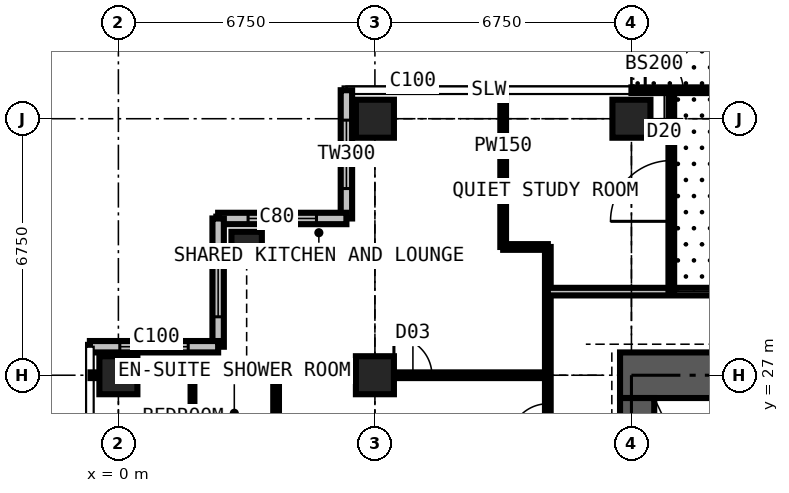
"""IFC4 building model, lengths in metres.
Left out: names, types, materials, properties, quantities, classifications, styles, units other than length and angle.
Written with IfcOpenShell. Run it as: python <this file> out.ifc"""

import sys

from ifc_helpers import new_model, si_unit, direction, frame, frame_2d, origin, origin_2d, place, context, subcontext, project, spatial, rectangle, extrude, element, fill, save


model = new_model("IFC4")
c1 = context("Model", 3, precision=1e-05, world=origin(), true_north=direction((0.0, 1.0)))
c2 = subcontext(c1, "Body", "Model", "MODEL_VIEW")
j1 = project(units=[si_unit("LENGTHUNIT", "METRE"), si_unit("PLANEANGLEUNIT", "RADIAN")], contexts=[c1])
p1 = place(None, origin())
s1 = spatial("IfcSite", under=j1, at=p1, CompositionType="ELEMENT")
p2 = place(p1, origin())
s2 = spatial("IfcBuilding", under=s1, at=p2, CompositionType="ELEMENT")
p3 = place(p2, frame((0.0, 0.0, 251.1)))
s3 = spatial("IfcBuildingStorey", under=s2, at=p3, CompositionType="ELEMENT", Elevation=251.1)
p4 = place(p3, frame((0.0, 27.0, 0.0), z_axis=(0.0, 0.0, 1.0), x_axis=(1.0, 0.0, 0.0)))
e1 = element("IfcColumn", 1, at=p4, inside=s3, PredefinedType="COLUMN", context=c2, shape_type="SweptSolid", body=[
    extrude(rectangle(XDim=1.0, YDim=1.0, at=origin_2d()), origin(), (0.0, 0.0, 1.0), 3.6),
])
p5 = place(p3, frame((3.375, 30.375, 0.0), z_axis=(0.0, 0.0, 1.0), x_axis=(1.0, 0.0, 0.0)))
e2 = element("IfcColumn", 2, at=p5, inside=s3, PredefinedType="COLUMN", context=c2, shape_type="SweptSolid", body=[
    extrude(rectangle(XDim=0.8, YDim=0.8, at=origin_2d()), origin(), (0.0, 0.0, 1.0), 3.6),
])
for number, where, z_axis, x_axis in (
    (3, (6.75, 27.0, 0.0), (0.0, 0.0, 1.0), (1.0, 0.0, 0.0)),
    (4, (6.75, 33.75, 0.0), (0.0, 0.0, 1.0), (1.0, 0.0, 0.0)),
    (5, (13.5, 33.75, 0.0), (0.0, 0.0, 1.0), (1.0, 0.0, 0.0)),
):
    element("IfcColumn", number, at=place(p3, frame(where, z_axis=z_axis, x_axis=x_axis)), inside=s3, PredefinedType="COLUMN", context=c2, shape_type="SweptSolid", body=[
        extrude(rectangle(XDim=1.0, YDim=1.0, at=origin_2d()), origin(), (0.0, 0.0, 1.0), 3.6),
    ])
p6 = place(p3, frame((27.3, 27.0, 0.0), z_axis=(0.0, 0.0, 1.0), x_axis=(-1.0, 0.0, 0.0)))
e6 = element("IfcWall", 6, at=p6, inside=s3, PredefinedType="SHEAR", context=c2, shape_type="SweptSolid", body=[
    extrude(rectangle(XDim=14.1, YDim=1.2, at=frame_2d((7.05, 0.0))), origin(), (0.0, 0.0, 1.0), 3.6),
])
p7 = place(p6, frame((5.225, 0.0, 0.0)))
e7 = element("IfcOpeningElement", 7, at=p7, cuts=e6, PredefinedType="OPENING", context=c2, shape_type="SweptSolid", body=[
    extrude(rectangle(XDim=0.9, YDim=2.2, at=frame_2d((0.45, 1.1))), frame((0.0, 0.61, 0.0), z_axis=(0.0, -1.0, 0.0), x_axis=(1.0, 0.0, 0.0)), (0.0, 0.0, 1.0), 1.22),
])
p8 = place(p6, frame((8.2, 0.0, 0.0)))
e8 = element("IfcOpeningElement", 8, at=p8, cuts=e6, PredefinedType="OPENING", context=c2, shape_type="SweptSolid", body=[
    extrude(rectangle(XDim=1.0, YDim=2.2, at=frame_2d((0.5, 1.1))), frame((0.0, 0.61, 0.0), z_axis=(0.0, -1.0, 0.0), x_axis=(1.0, 0.0, 0.0)), (0.0, 0.0, 1.0), 1.22),
])
p9 = place(p3, frame((13.65, 26.4, 0.0), z_axis=(0.0, 0.0, 1.0), x_axis=(0.0, -1.0, 0.0)))
e9 = element("IfcWall", 9, at=p9, inside=s3, PredefinedType="SHEAR", context=c2, shape_type="SweptSolid", body=[
    extrude(rectangle(XDim=12.3, YDim=0.9, at=frame_2d((6.15, 0.0))), origin(), (0.0, 0.0, 1.0), 3.6),
])
p10 = place(p9, frame((7.45, 0.0, 0.0)))
e10 = element("IfcOpeningElement", 10, at=p10, cuts=e9, PredefinedType="OPENING", context=c2, shape_type="SweptSolid", body=[
    extrude(rectangle(XDim=1.2, YDim=2.2, at=frame_2d((0.6, 1.1))), frame((0.0, 0.46, 0.0), z_axis=(0.0, -1.0, 0.0), x_axis=(1.0, 0.0, 0.0)), (0.0, 0.0, 1.0), 0.92),
])
p11 = place(p3, frame((13.5, 34.5, 0.0), z_axis=(0.0, 0.0, 1.0), x_axis=(1.0, 0.0, 0.0)))
e11 = element("IfcWall", 11, at=p11, inside=s3, PredefinedType="SOLIDWALL", context=c2, shape_type="SweptSolid", body=[
    extrude(rectangle(XDim=6.75, YDim=0.15, at=frame_2d((3.375, 0.0))), origin(), (0.0, 0.0, 1.0), 3.3),
])
p12 = place(p11, frame((0.363, 0.0, 0.0)))
e12 = element("IfcOpeningElement", 12, at=p12, cuts=e11, PredefinedType="OPENING", context=c2, shape_type="SweptSolid", body=[
    extrude(rectangle(XDim=1.0, YDim=2.2, at=frame_2d((0.5, 1.1))), frame((0.0, 0.085, 0.0), z_axis=(0.0, -1.0, 0.0), x_axis=(1.0, 0.0, 0.0)), (0.0, 0.0, 1.0), 0.17),
])
p13 = place(p11, frame((1.725, 0.0, 0.9)))
e13 = element("IfcOpeningElement", 13, at=p13, cuts=e11, PredefinedType="OPENING", context=c2, shape_type="SweptSolid", body=[
    extrude(rectangle(XDim=1.2, YDim=1.8, at=frame_2d((0.6, 0.9))), frame((0.0, 0.085, 0.0), z_axis=(0.0, -1.0, 0.0), x_axis=(1.0, 0.0, 0.0)), (0.0, 0.0, 1.0), 0.17),
])
p14 = place(p11, frame((5.387, 0.0, 0.0)))
e14 = element("IfcOpeningElement", 14, at=p14, cuts=e11, PredefinedType="OPENING", context=c2, shape_type="SweptSolid", body=[
    extrude(rectangle(XDim=1.0, YDim=2.2, at=frame_2d((0.5, 1.1))), frame((0.0, 0.085, 0.0), z_axis=(0.0, -1.0, 0.0), x_axis=(1.0, 0.0, 0.0)), (0.0, 0.0, 1.0), 0.17),
])
p15 = place(p11, frame((3.825, 0.0, 0.9)))
e15 = element("IfcOpeningElement", 15, at=p15, cuts=e11, PredefinedType="OPENING", context=c2, shape_type="SweptSolid", body=[
    extrude(rectangle(XDim=1.2, YDim=1.8, at=frame_2d((0.6, 0.9))), frame((0.0, 0.085, 0.0), z_axis=(0.0, -1.0, 0.0), x_axis=(1.0, 0.0, 0.0)), (0.0, 0.0, 1.0), 0.17),
])
p16 = place(p3, frame((6.0, 34.5, 0.0), z_axis=(0.0, 0.0, 1.0), x_axis=(0.0, -1.0, 0.0)))
e16 = element("IfcWall", 16, at=p16, inside=s3, PredefinedType="SOLIDWALL", context=c2, shape_type="SweptSolid", body=[
    extrude(rectangle(XDim=3.375, YDim=0.3, at=frame_2d((1.688, 0.0))), origin(), (0.0, 0.0, 1.0), 3.3),
])
p17 = place(p16, frame((0.788, 0.0, 0.6)))
e17 = element("IfcOpeningElement", 17, at=p17, cuts=e16, PredefinedType="OPENING", context=c2, shape_type="SweptSolid", body=[
    extrude(rectangle(XDim=1.8, YDim=2.1, at=frame_2d((0.9, 1.05))), frame((0.0, 0.16, 0.0), z_axis=(0.0, -1.0, 0.0), x_axis=(1.0, 0.0, 0.0)), (0.0, 0.0, 1.0), 0.32),
])
p18 = place(p3, frame((6.0, 31.125, 0.0), z_axis=(0.0, 0.0, 1.0), x_axis=(-1.0, 0.0, 0.0)))
e18 = element("IfcWall", 18, at=p18, inside=s3, PredefinedType="SOLIDWALL", context=c2, shape_type="SweptSolid", body=[
    extrude(rectangle(XDim=3.375, YDim=0.3, at=frame_2d((1.688, 0.0))), origin(), (0.0, 0.0, 1.0), 3.3),
])
p19 = place(p18, frame((0.788, 0.0, 0.6)))
e19 = element("IfcOpeningElement", 19, at=p19, cuts=e18, PredefinedType="OPENING", context=c2, shape_type="SweptSolid", body=[
    extrude(rectangle(XDim=1.8, YDim=2.1, at=frame_2d((0.9, 1.05))), frame((0.0, 0.16, 0.0), z_axis=(0.0, -1.0, 0.0), x_axis=(1.0, 0.0, 0.0)), (0.0, 0.0, 1.0), 0.32),
])
p20 = place(p3, frame((2.625, 31.125, 0.0), z_axis=(0.0, 0.0, 1.0), x_axis=(0.0, -1.0, 0.0)))
e20 = element("IfcWall", 20, at=p20, inside=s3, PredefinedType="SOLIDWALL", context=c2, shape_type="SweptSolid", body=[
    extrude(rectangle(XDim=3.375, YDim=0.3, at=frame_2d((1.688, 0.0))), origin(), (0.0, 0.0, 1.0), 3.3),
])
p21 = place(p20, frame((0.788, 0.0, 0.6)))
e21 = element("IfcOpeningElement", 21, at=p21, cuts=e20, PredefinedType="OPENING", context=c2, shape_type="SweptSolid", body=[
    extrude(rectangle(XDim=1.8, YDim=2.1, at=frame_2d((0.9, 1.05))), frame((0.0, 0.16, 0.0), z_axis=(0.0, -1.0, 0.0), x_axis=(1.0, 0.0, 0.0)), (0.0, 0.0, 1.0), 0.32),
])
p22 = place(p3, frame((2.625, 27.75, 0.0), z_axis=(0.0, 0.0, 1.0), x_axis=(-1.0, 0.0, 0.0)))
e22 = element("IfcWall", 22, at=p22, inside=s3, PredefinedType="SOLIDWALL", context=c2, shape_type="SweptSolid", body=[
    extrude(rectangle(XDim=3.375, YDim=0.3, at=frame_2d((1.688, 0.0))), origin(), (0.0, 0.0, 1.0), 3.3),
])
p23 = place(p22, frame((0.788, 0.0, 0.6)))
e23 = element("IfcOpeningElement", 23, at=p23, cuts=e22, PredefinedType="OPENING", context=c2, shape_type="SweptSolid", body=[
    extrude(rectangle(XDim=1.8, YDim=2.1, at=frame_2d((0.9, 1.05))), frame((0.0, 0.16, 0.0), z_axis=(0.0, -1.0, 0.0), x_axis=(1.0, 0.0, 0.0)), (0.0, 0.0, 1.0), 0.32),
])
p24 = place(p3, frame((-0.734, 27.0, 0.0), z_axis=(0.0, 0.0, 1.0), x_axis=(1.0, 0.0, 0.0)))
e24 = element("IfcWall", 24, at=p24, inside=s3, PredefinedType="PARTITIONING", context=c2, shape_type="SweptSolid", body=[
    extrude(rectangle(XDim=12.034, YDim=0.15, at=frame_2d((6.017, 0.0))), origin(), (0.0, 0.0, 1.0), 2.802),
])
p25 = place(p24, frame((7.984, 0.0, 0.0)))
e25 = element("IfcOpeningElement", 25, at=p25, cuts=e24, PredefinedType="OPENING", context=c2, shape_type="SweptSolid", body=[
    extrude(rectangle(XDim=1.0, YDim=2.2, at=frame_2d((0.5, 1.1))), frame((0.0, 0.085, 0.0), z_axis=(0.0, -1.0, 0.0), x_axis=(1.0, 0.0, 0.0)), (0.0, 0.0, 1.0), 0.17),
])
p26 = place(p3, frame((1.95, 25.0, 0.0), z_axis=(0.0, 0.0, 1.0), x_axis=(0.0, 1.0, 0.0)))
e26 = element("IfcWall", 26, at=p26, inside=s3, PredefinedType="PARTITIONING", context=c2, shape_type="SweptSolid", body=[
    extrude(rectangle(XDim=2.0, YDim=0.1, at=frame_2d((1.0, 0.0))), origin(), (0.0, 0.0, 1.0), 3.3),
])
p27 = place(p3, frame((4.15, 13.5, 0.0), z_axis=(0.0, 0.0, 1.0), x_axis=(0.0, 1.0, 0.0)))
e27 = element("IfcWall", 27, at=p27, inside=s3, PredefinedType="PARTITIONING", context=c2, shape_type="SweptSolid", body=[
    extrude(rectangle(XDim=13.5, YDim=0.15, at=frame_2d((6.75, 0.0))), origin(), (0.0, 0.0, 1.0), 3.3),
])
p28 = place(p27, frame((3.625, 0.0, 0.0)))
e28 = element("IfcOpeningElement", 28, at=p28, cuts=e27, PredefinedType="OPENING", context=c2, shape_type="SweptSolid", body=[
    extrude(rectangle(XDim=0.95, YDim=2.2, at=frame_2d((0.475, 1.1))), frame((0.0, 0.085, 0.0), z_axis=(0.0, -1.0, 0.0), x_axis=(1.0, 0.0, 0.0)), (0.0, 0.0, 1.0), 0.17),
])
p29 = place(p27, frame((7.0, 0.0, 0.0)))
e29 = element("IfcOpeningElement", 29, at=p29, cuts=e27, PredefinedType="OPENING", context=c2, shape_type="SweptSolid", body=[
    extrude(rectangle(XDim=0.95, YDim=2.2, at=frame_2d((0.475, 1.1))), frame((0.0, 0.085, 0.0), z_axis=(0.0, -1.0, 0.0), x_axis=(1.0, 0.0, 0.0)), (0.0, 0.0, 1.0), 0.17),
])
p30 = place(p27, frame((10.375, 0.0, 0.0)))
e30 = element("IfcOpeningElement", 30, at=p30, cuts=e27, PredefinedType="OPENING", context=c2, shape_type="SweptSolid", body=[
    extrude(rectangle(XDim=0.95, YDim=2.2, at=frame_2d((0.475, 1.1))), frame((0.0, 0.085, 0.0), z_axis=(0.0, -1.0, 0.0), x_axis=(1.0, 0.0, 0.0)), (0.0, 0.0, 1.0), 0.17),
])
p31 = place(p3, frame((10.125, 30.375, 0.0), z_axis=(0.0, 0.0, 1.0), x_axis=(0.0, 1.0, 0.0)))
e31 = element("IfcWall", 31, at=p31, inside=s3, PredefinedType="PARTITIONING", context=c2, shape_type="SweptSolid", body=[
    extrude(rectangle(XDim=4.109, YDim=0.15, at=frame_2d((2.054, 0.0))), origin(), (0.0, 0.0, 1.0), 3.3),
])
p32 = place(p3, frame((10.125, 30.375, 0.0), z_axis=(0.0, 0.0, 1.0), x_axis=(1.0, 0.0, 0.0)))
e32 = element("IfcWall", 32, at=p32, inside=s3, PredefinedType="PARTITIONING", context=c2, shape_type="SweptSolid", body=[
    extrude(rectangle(XDim=1.175, YDim=0.15, at=frame_2d((0.587, 0.0))), origin(), (0.0, 0.0, 1.0), 3.3),
])
p33 = place(p3, frame((11.3, 11.3, 0.0), z_axis=(0.0, 0.0, 1.0), x_axis=(0.0, 1.0, 0.0)))
e33 = element("IfcWall", 33, at=p33, inside=s3, PredefinedType="PARTITIONING", context=c2, shape_type="SweptSolid", body=[
    extrude(rectangle(XDim=19.075, YDim=0.15, at=frame_2d((9.538, 0.0))), origin(), (0.0, 0.0, 1.0), 3.3),
])
p34 = place(p33, frame((13.95, 0.0, 0.0)))
e34 = element("IfcOpeningElement", 34, at=p34, cuts=e33, PredefinedType="OPENING", context=c2, shape_type="SweptSolid", body=[
    extrude(rectangle(XDim=1.0, YDim=2.2, at=frame_2d((0.5, 1.1))), frame((0.0, 0.085, 0.0), z_axis=(0.0, -1.0, 0.0), x_axis=(1.0, 0.0, 0.0)), (0.0, 0.0, 1.0), 0.17),
])
p35 = place(p3, frame((11.3, 29.2, 0.0), z_axis=(0.0, 0.0, 1.0), x_axis=(1.0, 0.0, 0.0)))
e35 = element("IfcWall", 35, at=p35, inside=s3, PredefinedType="PARTITIONING", context=c2, shape_type="SweptSolid", body=[
    extrude(rectangle(XDim=17.9, YDim=0.2, at=frame_2d((8.95, 0.0))), origin(), (0.0, 0.0, 1.0), 3.3),
])
p36 = place(p35, frame((14.25, 0.0, 0.0)))
e36 = element("IfcOpeningElement", 36, at=p36, cuts=e35, PredefinedType="OPENING", context=c2, shape_type="SweptSolid", body=[
    extrude(rectangle(XDim=1.0, YDim=2.2, at=frame_2d((0.5, 1.1))), frame((0.0, 0.11, 0.0), z_axis=(0.0, -1.0, 0.0), x_axis=(1.0, 0.0, 0.0)), (0.0, 0.0, 1.0), 0.22),
])
p37 = place(p35, frame((16.35, 0.0, 0.0)))
e37 = element("IfcOpeningElement", 37, at=p37, cuts=e35, PredefinedType="OPENING", context=c2, shape_type="SweptSolid", body=[
    extrude(rectangle(XDim=1.0, YDim=2.2, at=frame_2d((0.5, 1.1))), frame((0.0, 0.11, 0.0), z_axis=(0.0, -1.0, 0.0), x_axis=(1.0, 0.0, 0.0)), (0.0, 0.0, 1.0), 0.22),
])
p38 = place(p35, frame((7.749, 0.0, 0.0)))
e38 = element("IfcOpeningElement", 38, at=p38, cuts=e35, PredefinedType="OPENING", context=c2, shape_type="SweptSolid", body=[
    extrude(rectangle(XDim=1.5, YDim=2.2, at=frame_2d((0.75, 1.1))), frame((0.0, 0.11, 0.0), z_axis=(0.0, -1.0, 0.0), x_axis=(1.0, 0.0, 0.0)), (0.0, 0.0, 1.0), 0.22),
])
p39 = place(p3, frame((14.549, 29.2, 0.0), z_axis=(0.0, 0.0, 1.0), x_axis=(0.0, 1.0, 0.0)))
e39 = element("IfcWall", 39, at=p39, inside=s3, PredefinedType="PARTITIONING", context=c2, shape_type="SweptSolid", body=[
    extrude(rectangle(XDim=5.225, YDim=0.15, at=frame_2d((2.613, 0.0))), origin(), (0.0, 0.0, 1.0), 3.3),
])
p40 = place(p39, frame((1.85, 0.0, 0.0)))
e40 = element("IfcOpeningElement", 40, at=p40, cuts=e39, PredefinedType="OPENING", context=c2, shape_type="SweptSolid", body=[
    extrude(rectangle(XDim=1.6, YDim=2.4, at=frame_2d((0.8, 1.2))), frame((0.0, 0.085, 0.0), z_axis=(0.0, -1.0, 0.0), x_axis=(1.0, 0.0, 0.0)), (0.0, 0.0, 1.0), 0.17),
])
p41 = place(p12, origin())
e41 = element("IfcDoor", 41, at=p41, inside=s3, OperationType="SINGLE_SWING_LEFT", PredefinedType="DOOR", context=c2, shape_type="SweptSolid", body=[
    extrude(rectangle(XDim=1.0, YDim=2.2, at=frame_2d((0.5, 1.1))), frame((0.0, 0.025, 0.0), z_axis=(0.0, -1.0, 0.0), x_axis=(1.0, 0.0, 0.0)), (0.0, 0.0, 1.0), 0.05),
])
fill(e12, e41)
p42 = place(p13, origin())
e42 = element("IfcWindow", 42, at=p42, inside=s3, PartitioningType="SINGLE_PANEL", PredefinedType="WINDOW", context=c2, shape_type="SweptSolid", body=[
    extrude(rectangle(XDim=1.2, YDim=1.8, at=frame_2d((0.6, 0.9))), frame((0.0, 0.03, 0.0), z_axis=(0.0, -1.0, 0.0), x_axis=(1.0, 0.0, 0.0)), (0.0, 0.0, 1.0), 0.06),
])
fill(e13, e42)
p43 = place(p17, origin())
e43 = element("IfcWindow", 43, at=p43, inside=s3, PartitioningType="SINGLE_PANEL", PredefinedType="WINDOW", context=c2, shape_type="SweptSolid", body=[
    extrude(rectangle(XDim=1.8, YDim=2.1, at=frame_2d((0.9, 1.05))), frame((0.0, 0.03, 0.0), z_axis=(0.0, -1.0, 0.0), x_axis=(1.0, 0.0, 0.0)), (0.0, 0.0, 1.0), 0.06),
])
fill(e17, e43)
p44 = place(p19, origin())
e44 = element("IfcWindow", 44, at=p44, inside=s3, PartitioningType="SINGLE_PANEL", PredefinedType="WINDOW", context=c2, shape_type="SweptSolid", body=[
    extrude(rectangle(XDim=1.8, YDim=2.1, at=frame_2d((0.9, 1.05))), frame((0.0, 0.03, 0.0), z_axis=(0.0, -1.0, 0.0), x_axis=(1.0, 0.0, 0.0)), (0.0, 0.0, 1.0), 0.06),
])
fill(e19, e44)
p45 = place(p21, origin())
e45 = element("IfcWindow", 45, at=p45, inside=s3, PartitioningType="SINGLE_PANEL", PredefinedType="WINDOW", context=c2, shape_type="SweptSolid", body=[
    extrude(rectangle(XDim=1.8, YDim=2.1, at=frame_2d((0.9, 1.05))), frame((0.0, 0.03, 0.0), z_axis=(0.0, -1.0, 0.0), x_axis=(1.0, 0.0, 0.0)), (0.0, 0.0, 1.0), 0.06),
])
fill(e21, e45)
p46 = place(p23, origin())
e46 = element("IfcWindow", 46, at=p46, inside=s3, PartitioningType="SINGLE_PANEL", PredefinedType="WINDOW", context=c2, shape_type="SweptSolid", body=[
    extrude(rectangle(XDim=1.8, YDim=2.1, at=frame_2d((0.9, 1.05))), frame((0.0, 0.03, 0.0), z_axis=(0.0, -1.0, 0.0), x_axis=(1.0, 0.0, 0.0)), (0.0, 0.0, 1.0), 0.06),
])
fill(e23, e46)
p47 = place(p40, origin())
e47 = element("IfcDoor", 47, at=p47, inside=s3, OperationType="DOUBLE_DOOR_SINGLE_SWING", PredefinedType="DOOR", context=c2, shape_type="SweptSolid", body=[
    extrude(rectangle(XDim=1.6, YDim=2.4, at=frame_2d((0.8, 1.2))), frame((0.0, 0.025, 0.0), z_axis=(0.0, -1.0, 0.0), x_axis=(1.0, 0.0, 0.0)), (0.0, 0.0, 1.0), 0.05),
])
fill(e40, e47)
p48 = place(p25, origin())
e48 = element("IfcDoor", 48, at=p48, inside=s3, OperationType="SINGLE_SWING_LEFT", PredefinedType="DOOR", context=c2, shape_type="SweptSolid", body=[
    extrude(rectangle(XDim=1.0, YDim=2.2, at=frame_2d((0.5, 1.1))), frame((0.0, 0.025, 0.0), z_axis=(0.0, -1.0, 0.0), x_axis=(1.0, 0.0, 0.0)), (0.0, 0.0, 1.0), 0.05),
])
fill(e25, e48)
p49 = place(p34, origin())
e49 = element("IfcDoor", 49, at=p49, inside=s3, OperationType="SINGLE_SWING_LEFT", PredefinedType="DOOR", context=c2, shape_type="SweptSolid", body=[
    extrude(rectangle(XDim=1.0, YDim=2.2, at=frame_2d((0.5, 1.1))), frame((0.0, 0.025, 0.0), z_axis=(0.0, -1.0, 0.0), x_axis=(1.0, 0.0, 0.0)), (0.0, 0.0, 1.0), 0.05),
])
fill(e34, e49)
save(model, sys.argv[1])
